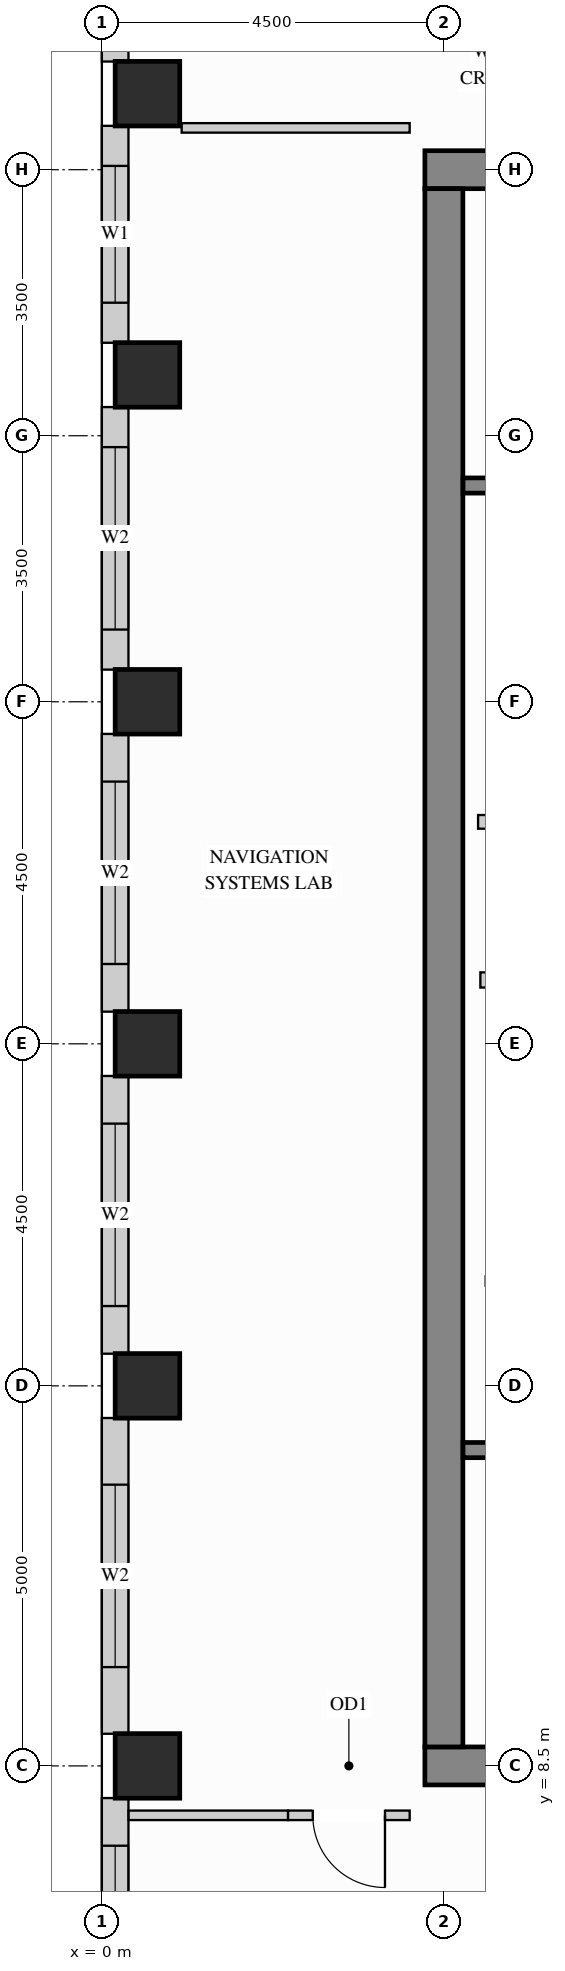
"""IFC4 building model, lengths in metres.
Left out: names, types, materials, properties, quantities, classifications, styles, units other than length and angle.
Written with IfcOpenShell. Run it as: python <this file> out.ifc"""

import sys

from ifc_helpers import new_model, si_unit, direction, frame, frame_2d, origin, origin_2d, place, context, subcontext, project, spatial, rectangle, extrude, source, transform, mapped, element, fill, save


model = new_model("IFC4")
c1 = context("Model", 3, precision=1e-05, world=origin(), true_north=direction((0.0, 1.0)))
c2 = subcontext(c1, "Body", "Model", "MODEL_VIEW")
j1 = project(units=[si_unit("LENGTHUNIT", "METRE"), si_unit("PLANEANGLEUNIT", "RADIAN")], contexts=[c1])
p1 = place(None, origin())
s1 = spatial("IfcSite", under=j1, at=p1, CompositionType="ELEMENT")
p2 = place(p1, origin())
s2 = spatial("IfcBuilding", under=s1, at=p2, CompositionType="ELEMENT")
p3 = place(p2, frame((0.0, 0.0, 234.0)))
s3 = spatial("IfcBuildingStorey", under=s2, at=p3, CompositionType="ELEMENT", Elevation=234.0)
m1 = source(origin(), c2, "Body", "SweptSolid", [
    extrude(rectangle(XDim=0.85, YDim=0.85, at=origin_2d()), origin(), (0.0, 0.0, 1.0), 3.4),
])
for number, where, z_axis, x_axis in (
    (1, (0.6, 13.5, 0.0), (0.0, 0.0, 1.0), (1.0, 0.0, 0.0)),
    (2, (0.6, 18.0, 0.0), (0.0, 0.0, 1.0), (1.0, 0.0, 0.0)),
    (3, (0.6, 22.5, 0.0), (0.0, 0.0, 1.0), (1.0, 0.0, 0.0)),
    (4, (0.6, 26.8, 0.0), (0.0, 0.0, 1.0), (1.0, 0.0, 0.0)),
    (5, (0.6, 30.5, 0.0), (0.0, 0.0, 1.0), (1.0, 0.0, 0.0)),
    (6, (0.6, 8.5, 0.0), (0.0, 0.0, 1.0), (1.0, 0.0, 0.0)),
):
    element("IfcColumn", number, at=place(p3, frame(where, z_axis=z_axis, x_axis=x_axis)), inside=s3, PredefinedType="COLUMN", context=c2, shape_type="MappedRepresentation", body=[
        mapped(m1, transform((0.0, 0.0, 0.0), x_axis=(1.0, 0.0, 0.0), y_axis=(0.0, 1.0, 0.0), z_axis=(0.0, 0.0, 1.0))),
    ])
m2 = source(origin(), c2, "Body", "SweptSolid", [
    extrude(rectangle(XDim=10.5, YDim=0.5, at=frame_2d((5.25, 0.0))), origin(), (0.0, 0.0, 1.0), 3.4),
])
for number, where, z_axis, x_axis in (
    (7, (4.25, 29.5, 0.0), (0.0, 0.0, 1.0), (1.0, 0.0, 0.0)),
    (8, (4.25, 8.5, 0.0), (0.0, 0.0, 1.0), (1.0, 0.0, 0.0)),
):
    element("IfcWall", number, at=place(p3, frame(where, z_axis=z_axis, x_axis=x_axis)), inside=s3, PredefinedType="SHEAR", context=c2, shape_type="MappedRepresentation", body=[
        mapped(m2, transform((0.0, 0.0, 0.0), x_axis=(1.0, 0.0, 0.0), y_axis=(0.0, 1.0, 0.0), z_axis=(0.0, 0.0, 1.0))),
    ])
m3 = source(origin(), c2, "Body", "SweptSolid", [
    extrude(rectangle(XDim=20.5, YDim=0.5, at=frame_2d((10.25, 0.0))), origin(), (0.0, 0.0, 1.0), 3.4),
])
p4 = place(p3, frame((4.5, 8.75, 0.0), z_axis=(0.0, 0.0, 1.0), x_axis=(0.0, 1.0, 0.0)))
e9 = element("IfcWall", 9, at=p4, inside=s3, PredefinedType="SHEAR", context=c2, shape_type="MappedRepresentation", body=[
    mapped(m3, transform((0.0, 0.0, 0.0), x_axis=(1.0, 0.0, 0.0), y_axis=(0.0, 1.0, 0.0), z_axis=(0.0, 0.0, 1.0))),
])
p5 = place(p3, frame((0.175, 34.577, 0.0), z_axis=(0.0, 0.0, 1.0), x_axis=(0.0, -1.0, 0.0)))
e10 = element("IfcWall", 10, at=p5, inside=s3, PredefinedType="SOLIDWALL", context=c2, shape_type="SweptSolid", body=[
    extrude(rectangle(XDim=3.654, YDim=0.35, at=frame_2d((1.827, 0.0))), origin(), (0.0, 0.0, 1.0), 3.385),
])
p6 = place(p5, frame((0.648, 0.0, 0.78)))
e11 = element("IfcOpeningElement", 11, at=p6, cuts=e10, PredefinedType="OPENING", context=c2, shape_type="SweptSolid", body=[
    extrude(rectangle(XDim=1.8, YDim=2.1, at=frame_2d((0.9, 1.05))), frame((0.0, 0.185, 0.0), z_axis=(0.0, -1.0, 0.0), x_axis=(1.0, 0.0, 0.0)), (0.0, 0.0, 1.0), 0.37),
])
p7 = place(p3, frame((0.175, 30.077, 0.0), z_axis=(0.0, 0.0, 1.0), x_axis=(0.0, -1.0, 0.0)))
e12 = element("IfcWall", 12, at=p7, inside=s3, PredefinedType="SOLIDWALL", context=c2, shape_type="SweptSolid", body=[
    extrude(rectangle(XDim=2.854, YDim=0.35, at=frame_2d((1.427, 0.0))), origin(), (0.0, 0.0, 1.0), 3.385),
])
p8 = place(p7, frame((0.527, 0.0, 0.78)))
e13 = element("IfcOpeningElement", 13, at=p8, cuts=e12, PredefinedType="OPENING", context=c2, shape_type="SweptSolid", body=[
    extrude(rectangle(XDim=1.8, YDim=2.1, at=frame_2d((0.9, 1.05))), frame((0.0, 0.185, 0.0), z_axis=(0.0, -1.0, 0.0), x_axis=(1.0, 0.0, 0.0)), (0.0, 0.0, 1.0), 0.37),
])
p9 = place(p3, frame((0.175, 26.377, 0.0), z_axis=(0.0, 0.0, 1.0), x_axis=(0.0, -1.0, 0.0)))
e14 = element("IfcWall", 14, at=p9, inside=s3, PredefinedType="SOLIDWALL", context=c2, shape_type="SweptSolid", body=[
    extrude(rectangle(XDim=3.454, YDim=0.35, at=frame_2d((1.727, 0.0))), origin(), (0.0, 0.0, 1.0), 3.385),
])
p10 = place(p9, frame((0.527, 0.0, 0.78)))
e15 = element("IfcOpeningElement", 15, at=p10, cuts=e14, PredefinedType="OPENING", context=c2, shape_type="SweptSolid", body=[
    extrude(rectangle(XDim=2.4, YDim=2.1, at=frame_2d((1.2, 1.05))), frame((0.0, 0.185, 0.0), z_axis=(0.0, -1.0, 0.0), x_axis=(1.0, 0.0, 0.0)), (0.0, 0.0, 1.0), 0.37),
])
p11 = place(p3, frame((0.175, 22.077, 0.0), z_axis=(0.0, 0.0, 1.0), x_axis=(0.0, -1.0, 0.0)))
e16 = element("IfcWall", 16, at=p11, inside=s3, PredefinedType="SOLIDWALL", context=c2, shape_type="SweptSolid", body=[
    extrude(rectangle(XDim=3.654, YDim=0.35, at=frame_2d((1.827, 0.0))), origin(), (0.0, 0.0, 1.0), 3.385),
])
p12 = place(p11, frame((0.627, 0.0, 0.78)))
e17 = element("IfcOpeningElement", 17, at=p12, cuts=e16, PredefinedType="OPENING", context=c2, shape_type="SweptSolid", body=[
    extrude(rectangle(XDim=2.4, YDim=2.1, at=frame_2d((1.2, 1.05))), frame((0.0, 0.185, 0.0), z_axis=(0.0, -1.0, 0.0), x_axis=(1.0, 0.0, 0.0)), (0.0, 0.0, 1.0), 0.37),
])
p13 = place(p3, frame((0.175, 17.577, 0.0), z_axis=(0.0, 0.0, 1.0), x_axis=(0.0, -1.0, 0.0)))
e18 = element("IfcWall", 18, at=p13, inside=s3, PredefinedType="SOLIDWALL", context=c2, shape_type="SweptSolid", body=[
    extrude(rectangle(XDim=3.654, YDim=0.35, at=frame_2d((1.827, 0.0))), origin(), (0.0, 0.0, 1.0), 3.385),
])
p14 = place(p13, frame((0.627, 0.0, 0.78)))
e19 = element("IfcOpeningElement", 19, at=p14, cuts=e18, PredefinedType="OPENING", context=c2, shape_type="SweptSolid", body=[
    extrude(rectangle(XDim=2.4, YDim=2.1, at=frame_2d((1.2, 1.05))), frame((0.0, 0.185, 0.0), z_axis=(0.0, -1.0, 0.0), x_axis=(1.0, 0.0, 0.0)), (0.0, 0.0, 1.0), 0.37),
])
p15 = place(p3, frame((0.175, 13.077, 0.0), z_axis=(0.0, 0.0, 1.0), x_axis=(0.0, -1.0, 0.0)))
e20 = element("IfcWall", 20, at=p15, inside=s3, PredefinedType="SOLIDWALL", context=c2, shape_type="SweptSolid", body=[
    extrude(rectangle(XDim=4.154, YDim=0.35, at=frame_2d((2.077, 0.0))), origin(), (0.0, 0.0, 1.0), 3.385),
])
p16 = place(p15, frame((0.877, 0.0, 0.78)))
e21 = element("IfcOpeningElement", 21, at=p16, cuts=e20, PredefinedType="OPENING", context=c2, shape_type="SweptSolid", body=[
    extrude(rectangle(XDim=2.4, YDim=2.1, at=frame_2d((1.2, 1.05))), frame((0.0, 0.185, 0.0), z_axis=(0.0, -1.0, 0.0), x_axis=(1.0, 0.0, 0.0)), (0.0, 0.0, 1.0), 0.37),
])
p17 = place(p3, frame((0.175, 8.077, 0.0), z_axis=(0.0, 0.0, 1.0), x_axis=(0.0, -1.0, 0.0)))
e22 = element("IfcWall", 22, at=p17, inside=s3, PredefinedType="SOLIDWALL", context=c2, shape_type="SweptSolid", body=[
    extrude(rectangle(XDim=4.154, YDim=0.35, at=frame_2d((2.077, 0.0))), origin(), (0.0, 0.0, 1.0), 3.385),
])
p18 = place(p17, frame((0.627, 0.0, 0.78)))
e23 = element("IfcOpeningElement", 23, at=p18, cuts=e22, PredefinedType="OPENING", context=c2, shape_type="SweptSolid", body=[
    extrude(rectangle(XDim=2.4, YDim=2.1, at=frame_2d((1.2, 1.05))), frame((0.0, 0.185, 0.0), z_axis=(0.0, -1.0, 0.0), x_axis=(1.0, 0.0, 0.0)), (0.0, 0.0, 1.0), 0.37),
])
m4 = source(origin(), c2, "Body", "SweptSolid", [
    extrude(rectangle(XDim=2.2, YDim=0.18, at=frame_2d((1.1, 0.0))), origin(), (0.0, 0.0, 1.0), 3.385),
])
p19 = place(p3, frame((4.95, 20.92, 0.0), z_axis=(0.0, 0.0, 1.0), x_axis=(1.0, 0.0, 0.0)))
e24 = element("IfcWall", 24, at=p19, inside=s3, PredefinedType="PARTITIONING", context=c2, shape_type="MappedRepresentation", body=[
    mapped(m4, transform((0.0, 0.0, 0.0), x_axis=(1.0, 0.0, 0.0), y_axis=(0.0, 1.0, 0.0), z_axis=(0.0, 0.0, 1.0))),
])
p20 = place(p3, frame((5.05, 14.88, 0.0), z_axis=(0.0, 0.0, 1.0), x_axis=(1.0, 0.0, 0.0)))
e25 = element("IfcWall", 25, at=p20, inside=s3, PredefinedType="PARTITIONING", context=c2, shape_type="SweptSolid", body=[
    extrude(rectangle(XDim=2.35, YDim=0.125, at=frame_2d((1.175, 0.0))), origin(), (0.0, 0.0, 1.0), 3.385),
])
p21 = place(p20, frame((0.7, 0.0, 0.0)))
e26 = element("IfcOpeningElement", 26, at=p21, cuts=e25, PredefinedType="OPENING", context=c2, shape_type="SweptSolid", body=[
    extrude(rectangle(XDim=0.85, YDim=2.1, at=frame_2d((0.425, 1.05))), frame((0.0, 0.073, 0.0), z_axis=(0.0, -1.0, 0.0), x_axis=(1.0, 0.0, 0.0)), (0.0, 0.0, 1.0), 0.145),
])
m5 = source(origin(), c2, "Body", "SweptSolid", [
    extrude(rectangle(XDim=3.0, YDim=0.125, at=frame_2d((1.5, 0.0))), origin(), (0.0, 0.0, 1.0), 3.385),
])
p22 = place(p3, frame((1.05, 30.05, 0.0), z_axis=(0.0, 0.0, 1.0), x_axis=(1.0, 0.0, 0.0)))
e27 = element("IfcWall", 27, at=p22, inside=s3, PredefinedType="PARTITIONING", context=c2, shape_type="MappedRepresentation", body=[
    mapped(m5, transform((0.0, 0.0, 0.0), x_axis=(1.0, 0.0, 0.0), y_axis=(0.0, 1.0, 0.0), z_axis=(0.0, 0.0, 1.0))),
])
m6 = source(origin(), c2, "Body", "SweptSolid", [
    extrude(rectangle(XDim=2.098, YDim=0.125, at=frame_2d((1.049, 0.0))), origin(), (0.0, 0.0, 1.0), 3.385),
])
p23 = place(p3, frame((0.352, 7.85, 0.0), z_axis=(0.0, 0.0, 1.0), x_axis=(1.0, 0.0, 0.0)))
e28 = element("IfcWall", 28, at=p23, inside=s3, PredefinedType="PARTITIONING", context=c2, shape_type="MappedRepresentation", body=[
    mapped(m6, transform((0.0, 0.0, 0.0), x_axis=(1.0, 0.0, 0.0), y_axis=(0.0, 1.0, 0.0), z_axis=(0.0, 0.0, 1.0))),
])
p24 = place(p3, frame((2.45, 7.85, 0.0), z_axis=(0.0, 0.0, 1.0), x_axis=(1.0, 0.0, 0.0)))
e29 = element("IfcWall", 29, at=p24, inside=s3, PredefinedType="PARTITIONING", context=c2, shape_type="SweptSolid", body=[
    extrude(rectangle(XDim=1.6, YDim=0.125, at=frame_2d((0.8, 0.0))), origin(), (0.0, 0.0, 1.0), 3.385),
])
p25 = place(p24, frame((0.325, 0.0, 0.0)))
e30 = element("IfcOpeningElement", 30, at=p25, cuts=e29, PredefinedType="OPENING", context=c2, shape_type="SweptSolid", body=[
    extrude(rectangle(XDim=0.95, YDim=2.15, at=frame_2d((0.475, 1.075))), frame((0.0, 0.073, 0.0), z_axis=(0.0, -1.0, 0.0), x_axis=(1.0, 0.0, 0.0)), (0.0, 0.0, 1.0), 0.145),
])
m7 = source(origin(), c2, "Body", "SweptSolid", [
    extrude(rectangle(XDim=2.09, YDim=0.2, at=frame_2d((1.045, 0.0))), origin(), (0.0, 0.0, 1.0), 3.385),
])
p26 = place(p3, frame((4.98, 18.84, 0.0), z_axis=(0.0, 0.0, 1.0), x_axis=(1.0, 0.0, 0.0)))
e31 = element("IfcWall", 31, at=p26, inside=s3, PredefinedType="PARTITIONING", context=c2, shape_type="MappedRepresentation", body=[
    mapped(m7, transform((0.0, 0.0, 0.0), x_axis=(1.0, 0.0, 0.0), y_axis=(0.0, 1.0, 0.0), z_axis=(0.0, 0.0, 1.0))),
])
p27 = place(p3, frame((4.752, 12.655, 0.0), z_axis=(0.0, 0.0, 1.0), x_axis=(1.0, 0.0, 0.0)))
e32 = element("IfcWall", 32, at=p27, inside=s3, PredefinedType="SHEAR", context=c2, shape_type="SweptSolid", body=[
    extrude(rectangle(XDim=7.653, YDim=0.2, at=frame_2d((3.827, 0.0))), origin(), (0.0, 0.0, 1.0), 3.4),
])
p28 = place(p27, frame((0.4, 0.0, 0.0)))
e33 = element("IfcOpeningElement", 33, at=p28, cuts=e32, PredefinedType="OPENING", context=c2, shape_type="SweptSolid", body=[
    extrude(rectangle(XDim=1.1, YDim=2.15, at=frame_2d((0.55, 1.075))), frame((0.0, 0.11, 0.0), z_axis=(0.0, -1.0, 0.0), x_axis=(1.0, 0.0, 0.0)), (0.0, 0.0, 1.0), 0.22),
])
p29 = place(p3, frame((4.752, 25.345, 0.0), z_axis=(0.0, 0.0, 1.0), x_axis=(1.0, 0.0, 0.0)))
e34 = element("IfcWall", 34, at=p29, inside=s3, PredefinedType="SHEAR", context=c2, shape_type="SweptSolid", body=[
    extrude(rectangle(XDim=7.653, YDim=0.2, at=frame_2d((3.827, 0.0))), origin(), (0.0, 0.0, 1.0), 3.4),
])
p30 = place(p29, frame((0.4, 0.0, 0.0)))
e35 = element("IfcOpeningElement", 35, at=p30, cuts=e34, PredefinedType="OPENING", context=c2, shape_type="SweptSolid", body=[
    extrude(rectangle(XDim=1.1, YDim=2.15, at=frame_2d((0.55, 1.075))), frame((0.0, 0.11, 0.0), z_axis=(0.0, -1.0, 0.0), x_axis=(1.0, 0.0, 0.0)), (0.0, 0.0, 1.0), 0.22),
])
m8 = source(origin(), c2, "Body", "SweptSolid", [
    extrude(rectangle(XDim=0.95, YDim=2.15, at=frame_2d((0.475, 1.075))), frame((0.0, 0.025, 0.0), z_axis=(0.0, -1.0, 0.0), x_axis=(1.0, 0.0, 0.0)), (0.0, 0.0, 1.0), 0.05),
])
p31 = place(p25, origin())
e36 = element("IfcDoor", 36, at=p31, inside=s3, OperationType="SINGLE_SWING_RIGHT", PredefinedType="DOOR", context=c2, shape_type="MappedRepresentation", body=[
    mapped(m8, transform((0.0, 0.0, 0.0), x_axis=(1.0, 0.0, 0.0), y_axis=(0.0, 1.0, 0.0), z_axis=(0.0, 0.0, 1.0))),
])
fill(e30, e36)
m9 = source(origin(), c2, "Body", "SweptSolid", [
    extrude(rectangle(XDim=1.8, YDim=2.1, at=frame_2d((0.9, 1.05))), frame((0.0, 0.03, 0.0), z_axis=(0.0, -1.0, 0.0), x_axis=(1.0, 0.0, 0.0)), (0.0, 0.0, 1.0), 0.06),
])
p32 = place(p8, origin())
e37 = element("IfcWindow", 37, at=p32, inside=s3, PartitioningType="SINGLE_PANEL", PredefinedType="WINDOW", context=c2, shape_type="MappedRepresentation", body=[
    mapped(m9, transform((0.0, 0.0, 0.0), x_axis=(1.0, 0.0, 0.0), y_axis=(0.0, 1.0, 0.0), z_axis=(0.0, 0.0, 1.0))),
])
fill(e13, e37)
m10 = source(origin(), c2, "Body", "SweptSolid", [
    extrude(rectangle(XDim=2.4, YDim=2.1, at=frame_2d((1.2, 1.05))), frame((0.0, 0.03, 0.0), z_axis=(0.0, -1.0, 0.0), x_axis=(1.0, 0.0, 0.0)), (0.0, 0.0, 1.0), 0.06),
])
p33 = place(p10, origin())
e38 = element("IfcWindow", 38, at=p33, inside=s3, PartitioningType="SINGLE_PANEL", PredefinedType="WINDOW", context=c2, shape_type="MappedRepresentation", body=[
    mapped(m10, transform((0.0, 0.0, 0.0), x_axis=(1.0, 0.0, 0.0), y_axis=(0.0, 1.0, 0.0), z_axis=(0.0, 0.0, 1.0))),
])
fill(e15, e38)
p34 = place(p12, origin())
e39 = element("IfcWindow", 39, at=p34, inside=s3, PartitioningType="SINGLE_PANEL", PredefinedType="WINDOW", context=c2, shape_type="MappedRepresentation", body=[
    mapped(m10, transform((0.0, 0.0, 0.0), x_axis=(1.0, 0.0, 0.0), y_axis=(0.0, 1.0, 0.0), z_axis=(0.0, 0.0, 1.0))),
])
fill(e17, e39)
p35 = place(p14, origin())
e40 = element("IfcWindow", 40, at=p35, inside=s3, PartitioningType="SINGLE_PANEL", PredefinedType="WINDOW", context=c2, shape_type="MappedRepresentation", body=[
    mapped(m10, transform((0.0, 0.0, 0.0), x_axis=(1.0, 0.0, 0.0), y_axis=(0.0, 1.0, 0.0), z_axis=(0.0, 0.0, 1.0))),
])
fill(e19, e40)
p36 = place(p16, origin())
e41 = element("IfcWindow", 41, at=p36, inside=s3, PartitioningType="SINGLE_PANEL", PredefinedType="WINDOW", context=c2, shape_type="MappedRepresentation", body=[
    mapped(m10, transform((0.0, 0.0, 0.0), x_axis=(1.0, 0.0, 0.0), y_axis=(0.0, 1.0, 0.0), z_axis=(0.0, 0.0, 1.0))),
])
fill(e21, e41)
p37 = place(p18, origin())
e42 = element("IfcWindow", 42, at=p37, inside=s3, PartitioningType="SINGLE_PANEL", PredefinedType="WINDOW", context=c2, shape_type="MappedRepresentation", body=[
    mapped(m10, transform((0.0, 0.0, 0.0), x_axis=(1.0, 0.0, 0.0), y_axis=(0.0, 1.0, 0.0), z_axis=(0.0, 0.0, 1.0))),
])
fill(e23, e42)
save(model, sys.argv[1])
